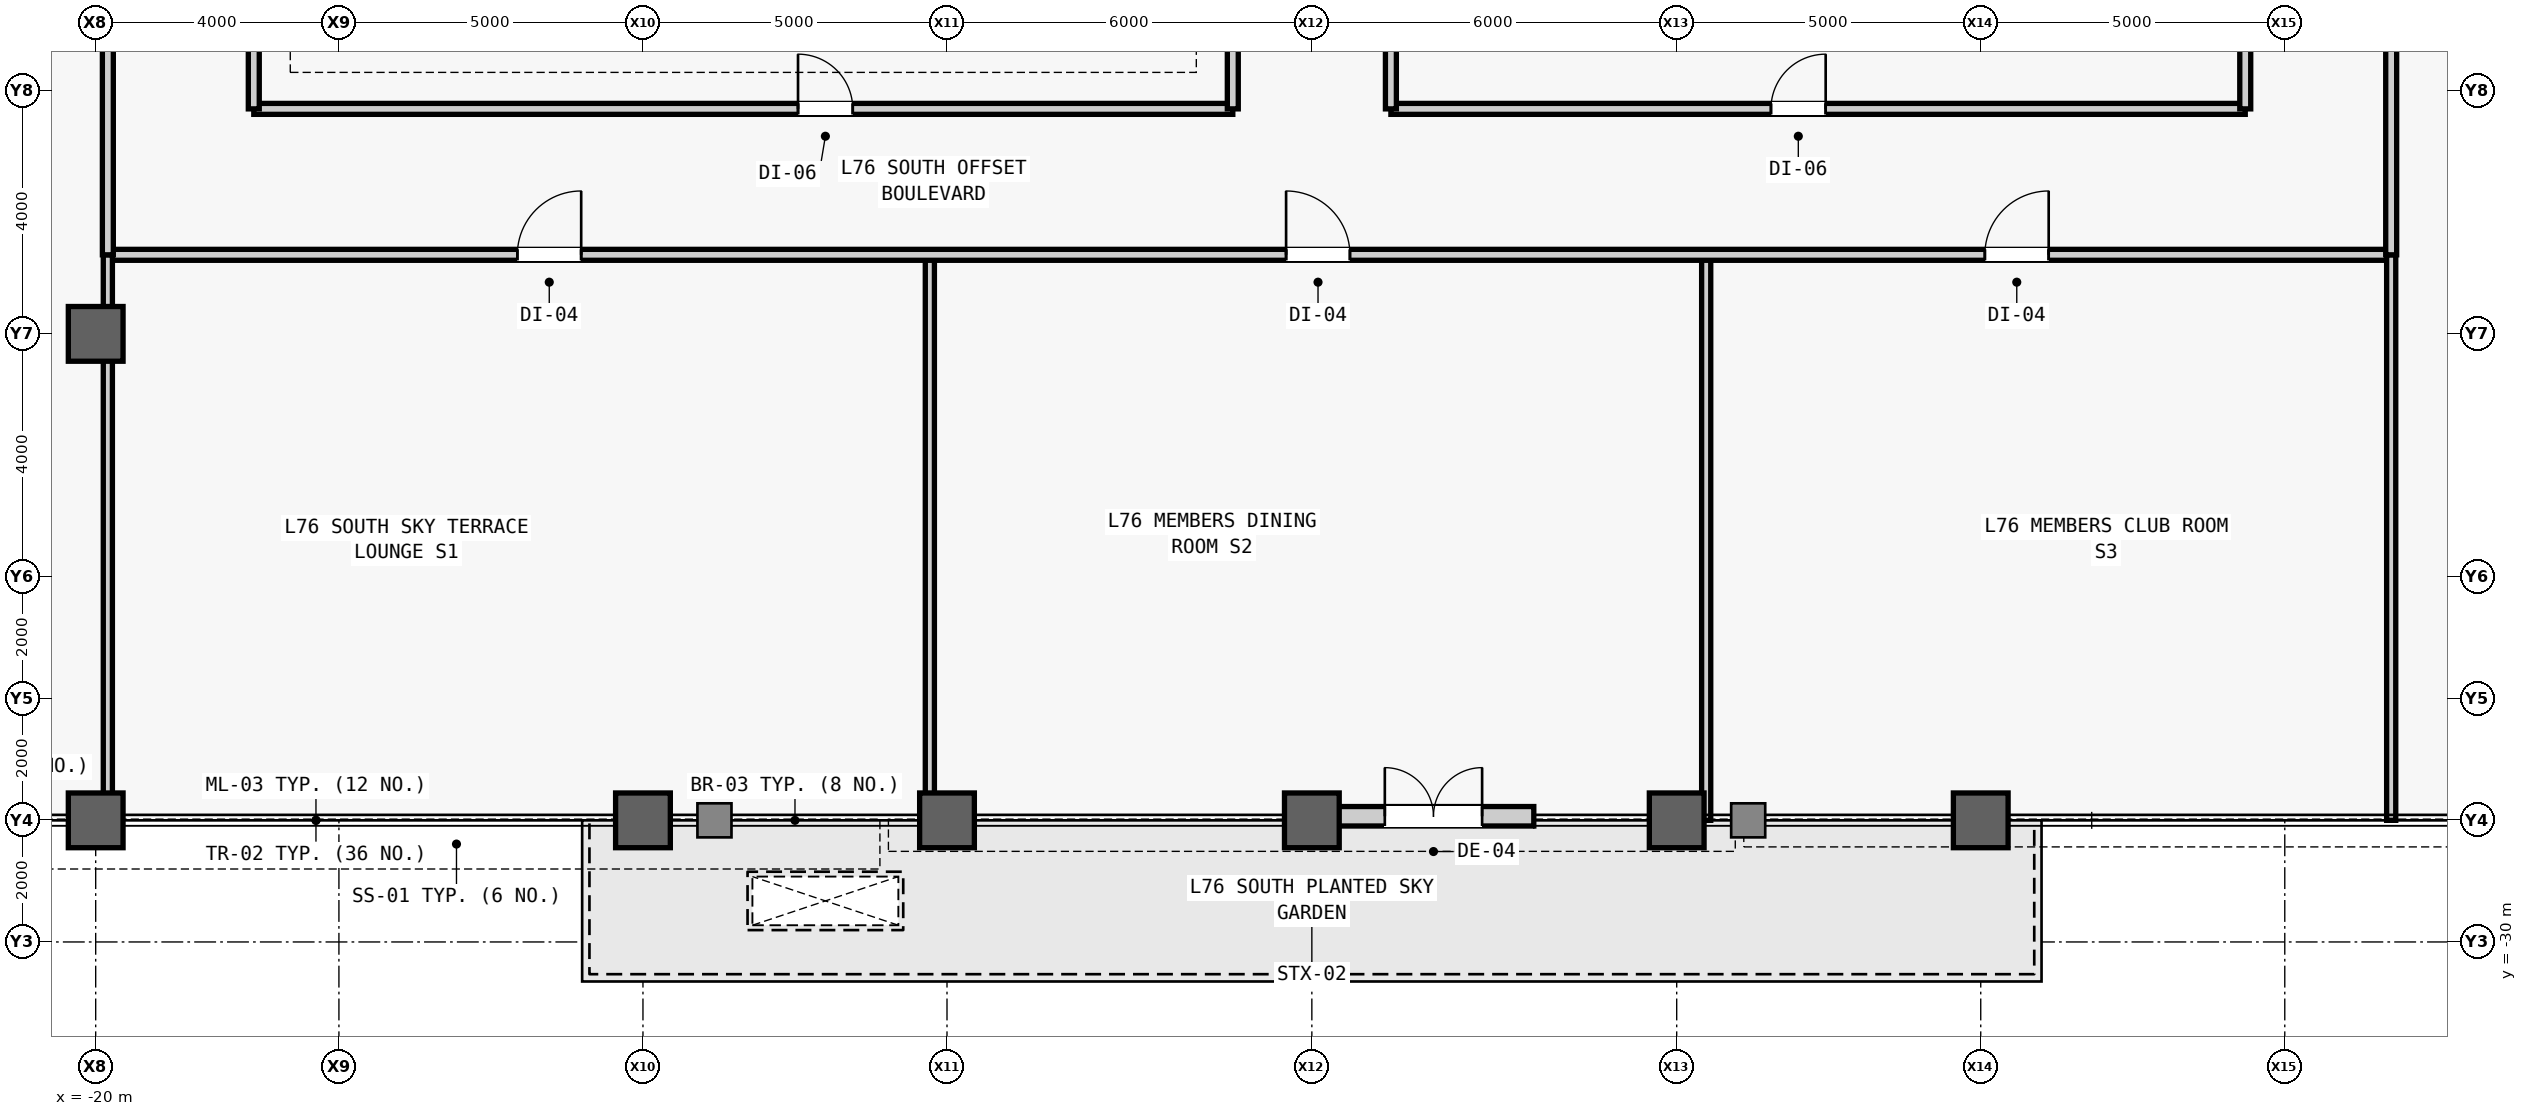
"""IFC4 building model, lengths in metres.
Left out: names, types, materials, properties, quantities, classifications, styles, units other than length and angle.
Written with IfcOpenShell. Run it as: python <this file> out.ifc"""

import sys

from ifc_helpers import new_model, si_unit, direction, frame, frame_2d, origin, origin_2d, place, context, subcontext, project, spatial, rectangle, hollow_rectangle, extrude, source, transform, mapped, element, fill, save


model = new_model("IFC4")
c1 = context("Model", 3, precision=1e-05, world=origin(), true_north=direction((0.0, 1.0)))
c2 = subcontext(c1, "Body", "Model", "MODEL_VIEW")
j1 = project(units=[si_unit("LENGTHUNIT", "METRE"), si_unit("PLANEANGLEUNIT", "RADIAN")], contexts=[c1])
p1 = place(None, origin())
s1 = spatial("IfcSite", under=j1, at=p1, CompositionType="ELEMENT")
p2 = place(p1, origin())
s2 = spatial("IfcBuilding", under=s1, at=p2, CompositionType="ELEMENT")
p3 = place(p2, frame((0.0, 0.0, 321.5)))
s3 = spatial("IfcBuildingStorey", under=s2, at=p3, CompositionType="ELEMENT", Elevation=321.5)
m1 = source(origin(), c2, "Body", "SweptSolid", [
    extrude(hollow_rectangle(XDim=0.9, YDim=0.9, WallThickness=0.05, at=origin_2d()), origin(), (0.0, 0.0, 1.0), 4.8),
])
for number, where, z_axis, x_axis in (
    (1, (-20.0, -28.0, 0.0), (0.0, 0.0, 1.0), (1.0, 0.0, 0.0)),
    (2, (-20.0, -20.0, 0.0), (0.0, 0.0, 1.0), (1.0, 0.0, 0.0)),
    (3, (-11.0, -28.0, 0.0), (0.0, 0.0, 1.0), (1.0, 0.0, 0.0)),
    (4, (-6.0, -28.0, 0.0), (0.0, 0.0, 1.0), (1.0, 0.0, 0.0)),
    (5, (0.0, -28.0, 0.0), (0.0, 0.0, 1.0), (1.0, 0.0, 0.0)),
    (6, (6.0, -28.0, 0.0), (0.0, 0.0, 1.0), (1.0, 0.0, 0.0)),
    (7, (11.0, -28.0, 0.0), (0.0, 0.0, 1.0), (1.0, 0.0, 0.0)),
):
    element("IfcColumn", number, at=place(p3, frame(where, z_axis=z_axis, x_axis=x_axis)), inside=s3, PredefinedType="COLUMN", context=c2, shape_type="MappedRepresentation", body=[
        mapped(m1, transform((0.0, 0.0, 0.0), scale=1.0)),
    ])
m2 = source(origin(), c2, "Body", "SweptSolid", [
    extrude(rectangle(XDim=3.3, YDim=0.32, at=frame_2d((1.65, 0.0))), origin(), (0.0, 0.0, 1.0), 3.951),
])
p4 = place(p3, frame((0.35, -27.933, 0.0), z_axis=(0.0, 0.0, 1.0), x_axis=(1.0, 0.0, 0.0)))
e8 = element("IfcWall", 8, at=p4, inside=s3, PredefinedType="STANDARD", context=c2, shape_type="MappedRepresentation", body=[
    mapped(m2, transform((0.0, 0.0, 0.0), scale=1.0)),
])
m3 = source(origin(), c2, "Body", "SweptSolid", [
    extrude(rectangle(XDim=1.6, YDim=2.25, at=frame_2d((0.8, 1.125))), frame((0.0, 0.17, 0.0), z_axis=(0.0, -1.0, 0.0), x_axis=(1.0, 0.0, 0.0)), (0.0, 0.0, 1.0), 0.34),
])
p5 = place(p4, frame((0.85, 0.0, 0.0)))
e9 = element("IfcOpeningElement", 9, at=p5, cuts=e8, PredefinedType="OPENING", context=c2, shape_type="MappedRepresentation", body=[
    mapped(m3, transform((0.0, 0.0, 0.0), scale=1.0)),
])
m4 = source(origin(), c2, "Body", "SweptSolid", [
    extrude(rectangle(XDim=16.1, YDim=0.18, at=frame_2d((8.05, 0.0))), origin(), (0.0, 0.0, 1.0), 4.54),
])
p6 = place(p3, frame((-17.4, -16.3, 0.0), z_axis=(0.0, 0.0, 1.0), x_axis=(1.0, 0.0, 0.0)))
e10 = element("IfcWall", 10, at=p6, inside=s3, PredefinedType="PARTITIONING", context=c2, shape_type="MappedRepresentation", body=[
    mapped(m4, transform((0.0, 0.0, 0.0), scale=1.0)),
])
m5 = source(origin(), c2, "Body", "SweptSolid", [
    extrude(rectangle(XDim=0.9, YDim=2.15, at=frame_2d((0.45, 1.075))), frame((0.0, 0.1, 0.0), z_axis=(0.0, -1.0, 0.0), x_axis=(1.0, 0.0, 0.0)), (0.0, 0.0, 1.0), 0.2),
])
p7 = place(p6, frame((8.95, 0.0, 0.0)))
e11 = element("IfcOpeningElement", 11, at=p7, cuts=e10, PredefinedType="OPENING", context=c2, shape_type="MappedRepresentation", body=[
    mapped(m5, transform((0.0, 0.0, 0.0), scale=1.0)),
])
m6 = source(origin(), c2, "Body", "SweptSolid", [
    extrude(rectangle(XDim=6.5, YDim=0.18, at=frame_2d((3.25, 0.0))), origin(), (0.0, 0.0, 1.0), 4.54),
])
p8 = place(p3, frame((-17.4, -16.3, 0.0), z_axis=(0.0, 0.0, 1.0), x_axis=(0.0, 1.0, 0.0)))
e12 = element("IfcWall", 12, at=p8, inside=s3, PredefinedType="PARTITIONING", context=c2, shape_type="MappedRepresentation", body=[
    mapped(m6, transform((0.0, 0.0, 0.0), scale=1.0)),
])
m7 = source(origin(), c2, "Body", "SweptSolid", [
    extrude(rectangle(XDim=5.3, YDim=0.18, at=frame_2d((2.65, 0.0))), origin(), (0.0, 0.0, 1.0), 4.54),
])
p9 = place(p3, frame((-1.3, -16.3, 0.0), z_axis=(0.0, 0.0, 1.0), x_axis=(0.0, 1.0, 0.0)))
e13 = element("IfcWall", 13, at=p9, inside=s3, PredefinedType="PARTITIONING", context=c2, shape_type="MappedRepresentation", body=[
    mapped(m7, transform((0.0, 0.0, 0.0), scale=1.0)),
])
m8 = source(origin(), c2, "Body", "SweptSolid", [
    extrude(rectangle(XDim=14.05, YDim=0.18, at=frame_2d((7.025, 0.0))), origin(), (0.0, 0.0, 1.0), 4.54),
])
p10 = place(p3, frame((1.3, -16.3, 0.0), z_axis=(0.0, 0.0, 1.0), x_axis=(1.0, 0.0, 0.0)))
e14 = element("IfcWall", 14, at=p10, inside=s3, PredefinedType="PARTITIONING", context=c2, shape_type="MappedRepresentation", body=[
    mapped(m8, transform((0.0, 0.0, 0.0), scale=1.0)),
])
p11 = place(p10, frame((6.25, 0.0, 0.0)))
e15 = element("IfcOpeningElement", 15, at=p11, cuts=e14, PredefinedType="OPENING", context=c2, shape_type="MappedRepresentation", body=[
    mapped(m5, transform((0.0, 0.0, 0.0), scale=1.0)),
])
p12 = place(p3, frame((1.3, -16.3, 0.0), z_axis=(0.0, 0.0, 1.0), x_axis=(0.0, 1.0, 0.0)))
e16 = element("IfcWall", 16, at=p12, inside=s3, PredefinedType="PARTITIONING", context=c2, shape_type="MappedRepresentation", body=[
    mapped(m7, transform((0.0, 0.0, 0.0), scale=1.0)),
])
m9 = source(origin(), c2, "Body", "SweptSolid", [
    extrude(rectangle(XDim=5.8, YDim=0.18, at=frame_2d((2.9, 0.0))), origin(), (0.0, 0.0, 1.0), 4.54),
])
p13 = place(p3, frame((15.35, -16.3, 0.0), z_axis=(0.0, 0.0, 1.0), x_axis=(0.0, 1.0, 0.0)))
e17 = element("IfcWall", 17, at=p13, inside=s3, PredefinedType="PARTITIONING", context=c2, shape_type="MappedRepresentation", body=[
    mapped(m9, transform((0.0, 0.0, 0.0), scale=1.0)),
])
m10 = source(origin(), c2, "Body", "SweptSolid", [
    extrude(rectangle(XDim=9.3, YDim=0.15, at=frame_2d((4.65, 0.0))), origin(), (0.0, 0.0, 1.0), 2.7),
])
p14 = place(p3, frame((-6.282, -28.0, 0.0), z_axis=(0.0, 0.0, 1.0), x_axis=(0.0, 1.0, 0.0)))
e18 = element("IfcWall", 18, at=p14, inside=s3, PredefinedType="PARTITIONING", context=c2, shape_type="MappedRepresentation", body=[
    mapped(m10, transform((0.0, 0.0, 0.0), scale=1.0)),
])
m11 = source(origin(), c2, "Body", "SweptSolid", [
    extrude(rectangle(XDim=9.3, YDim=0.15, at=frame_2d((4.65, 0.0))), origin(), (0.0, 0.0, 1.0), 4.54),
])
p15 = place(p3, frame((6.485, -28.0, 0.0), z_axis=(0.0, 0.0, 1.0), x_axis=(0.0, 1.0, 0.0)))
e19 = element("IfcWall", 19, at=p15, inside=s3, PredefinedType="PARTITIONING", context=c2, shape_type="MappedRepresentation", body=[
    mapped(m11, transform((0.0, 0.0, 0.0), scale=1.0)),
])
m12 = source(origin(), c2, "Body", "SweptSolid", [
    extrude(rectangle(XDim=37.55, YDim=0.18, at=frame_2d((18.775, 0.0))), origin(), (0.0, 0.0, 1.0), 4.54),
])
p16 = place(p3, frame((-19.8, -18.7, 0.0), z_axis=(0.0, 0.0, 1.0), x_axis=(1.0, 0.0, 0.0)))
e20 = element("IfcWall", 20, at=p16, inside=s3, PredefinedType="PARTITIONING", context=c2, shape_type="MappedRepresentation", body=[
    mapped(m12, transform((0.0, 0.0, 0.0), scale=1.0)),
])
m13 = source(origin(), c2, "Body", "SweptSolid", [
    extrude(rectangle(XDim=1.05, YDim=2.2, at=frame_2d((0.525, 1.1))), frame((0.0, 0.1, 0.0), z_axis=(0.0, -1.0, 0.0), x_axis=(1.0, 0.0, 0.0)), (0.0, 0.0, 1.0), 0.2),
])
p17 = place(p16, frame((6.734, 0.0, 0.0)))
e21 = element("IfcOpeningElement", 21, at=p17, cuts=e20, PredefinedType="OPENING", context=c2, shape_type="MappedRepresentation", body=[
    mapped(m13, transform((0.0, 0.0, 0.0), scale=1.0)),
])
p18 = place(p16, frame((19.376, 0.0, 0.0)))
e22 = element("IfcOpeningElement", 22, at=p18, cuts=e20, PredefinedType="OPENING", context=c2, shape_type="MappedRepresentation", body=[
    mapped(m13, transform((0.0, 0.0, 0.0), scale=1.0)),
])
p19 = place(p16, frame((30.867, 0.0, 0.0)))
e23 = element("IfcOpeningElement", 23, at=p19, cuts=e20, PredefinedType="OPENING", context=c2, shape_type="MappedRepresentation", body=[
    mapped(m13, transform((0.0, 0.0, 0.0), scale=1.0)),
])
p20 = place(p3, frame((-19.8, -28.0, 0.0), z_axis=(0.0, 0.0, 1.0), x_axis=(0.0, 1.0, 0.0)))
e24 = element("IfcWall", 24, at=p20, inside=s3, PredefinedType="PARTITIONING", context=c2, shape_type="MappedRepresentation", body=[
    mapped(m10, transform((0.0, 0.0, 0.0), scale=1.0)),
])
p21 = place(p3, frame((17.75, -28.0, 0.0), z_axis=(0.0, 0.0, 1.0), x_axis=(0.0, 1.0, 0.0)))
e25 = element("IfcWall", 25, at=p21, inside=s3, PredefinedType="PARTITIONING", context=c2, shape_type="MappedRepresentation", body=[
    mapped(m11, transform((0.0, 0.0, 0.0), scale=1.0)),
])
m14 = source(origin(), c2, "Body", "SweptSolid", [
    extrude(rectangle(XDim=41.2, YDim=0.18, at=frame_2d((20.6, 0.0))), origin(), (0.0, 0.0, 1.0), 2.7),
])
p22 = place(p3, frame((-19.8, -18.7, 0.0), z_axis=(0.0, 0.0, 1.0), x_axis=(0.0, 1.0, 0.0)))
e26 = element("IfcWall", 26, at=p22, inside=s3, PredefinedType="PARTITIONING", context=c2, shape_type="MappedRepresentation", body=[
    mapped(m14, transform((0.0, 0.0, 0.0), scale=1.0)),
])
m15 = source(origin(), c2, "Body", "SweptSolid", [
    extrude(rectangle(XDim=0.95, YDim=2.15, at=frame_2d((0.475, 1.075))), frame((0.0, 0.1, 0.0), z_axis=(0.0, -1.0, 0.0), x_axis=(1.0, 0.0, 0.0)), (0.0, 0.0, 1.0), 0.2),
])
p23 = place(p22, frame((17.875, 0.0, 0.0)))
e27 = element("IfcOpeningElement", 27, at=p23, cuts=e26, PredefinedType="OPENING", context=c2, shape_type="MappedRepresentation", body=[
    mapped(m15, transform((0.0, 0.0, 0.0), scale=1.0)),
])
m16 = source(origin(), c2, "Body", "SweptSolid", [
    extrude(rectangle(XDim=41.2, YDim=0.18, at=frame_2d((20.6, 0.0))), origin(), (0.0, 0.0, 1.0), 4.54),
])
p24 = place(p3, frame((17.75, -18.7, 0.0), z_axis=(0.0, 0.0, 1.0), x_axis=(0.0, 1.0, 0.0)))
e28 = element("IfcWall", 28, at=p24, inside=s3, PredefinedType="PARTITIONING", context=c2, shape_type="MappedRepresentation", body=[
    mapped(m16, transform((0.0, 0.0, 0.0), scale=1.0)),
])
p25 = place(p24, frame((9.102, 0.0, 0.0)))
e29 = element("IfcOpeningElement", 29, at=p25, cuts=e28, PredefinedType="OPENING", context=c2, shape_type="MappedRepresentation", body=[
    mapped(m15, transform((0.0, 0.0, 0.0), scale=1.0)),
])
p26 = place(p24, frame((23.452, 0.0, 0.0)))
e30 = element("IfcOpeningElement", 30, at=p26, cuts=e28, PredefinedType="OPENING", context=c2, shape_type="MappedRepresentation", body=[
    mapped(m15, transform((0.0, 0.0, 0.0), scale=1.0)),
])
m17 = source(origin(), c2, "Body", "SweptSolid", [
    extrude(rectangle(XDim=1.6, YDim=2.25, at=frame_2d((0.8, 1.125))), frame((0.0, 0.025, 0.0), z_axis=(0.0, -1.0, 0.0), x_axis=(1.0, 0.0, 0.0)), (0.0, 0.0, 1.0), 0.05),
])
p27 = place(p5, origin())
e31 = element("IfcDoor", 31, at=p27, inside=s3, OperationType="DOUBLE_DOOR_SINGLE_SWING", PredefinedType="DOOR", context=c2, shape_type="MappedRepresentation", body=[
    mapped(m17, transform((0.0, 0.0, 0.0), scale=1.0)),
])
fill(e9, e31)
m18 = source(origin(), c2, "Body", "SweptSolid", [
    extrude(rectangle(XDim=0.9, YDim=2.15, at=frame_2d((0.45, 1.075))), frame((0.0, 0.025, 0.0), z_axis=(0.0, -1.0, 0.0), x_axis=(1.0, 0.0, 0.0)), (0.0, 0.0, 1.0), 0.05),
])
p28 = place(p7, origin())
e32 = element("IfcDoor", 32, at=p28, inside=s3, OperationType="SINGLE_SWING_LEFT", PredefinedType="DOOR", context=c2, shape_type="MappedRepresentation", body=[
    mapped(m18, transform((0.0, 0.0, 0.0), scale=1.0)),
])
fill(e11, e32)
p29 = place(p11, origin())
e33 = element("IfcDoor", 33, at=p29, inside=s3, OperationType="SINGLE_SWING_RIGHT", PredefinedType="DOOR", context=c2, shape_type="MappedRepresentation", body=[
    mapped(m18, transform((0.0, 0.0, 0.0), scale=1.0)),
])
fill(e15, e33)
m19 = source(origin(), c2, "Body", "SweptSolid", [
    extrude(rectangle(XDim=1.05, YDim=2.2, at=frame_2d((0.525, 1.1))), frame((0.0, 0.025, 0.0), z_axis=(0.0, -1.0, 0.0), x_axis=(1.0, 0.0, 0.0)), (0.0, 0.0, 1.0), 0.05),
])
p30 = place(p17, origin())
e34 = element("IfcDoor", 34, at=p30, inside=s3, OperationType="SINGLE_SWING_RIGHT", PredefinedType="DOOR", context=c2, shape_type="MappedRepresentation", body=[
    mapped(m19, transform((0.0, 0.0, 0.0), scale=1.0)),
])
fill(e21, e34)
p31 = place(p18, origin())
e35 = element("IfcDoor", 35, at=p31, inside=s3, OperationType="SINGLE_SWING_LEFT", PredefinedType="DOOR", context=c2, shape_type="MappedRepresentation", body=[
    mapped(m19, transform((0.0, 0.0, 0.0), scale=1.0)),
])
fill(e22, e35)
p32 = place(p19, origin())
e36 = element("IfcDoor", 36, at=p32, inside=s3, OperationType="SINGLE_SWING_RIGHT", PredefinedType="DOOR", context=c2, shape_type="MappedRepresentation", body=[
    mapped(m19, transform((0.0, 0.0, 0.0), scale=1.0)),
])
fill(e23, e36)
save(model, sys.argv[1])
